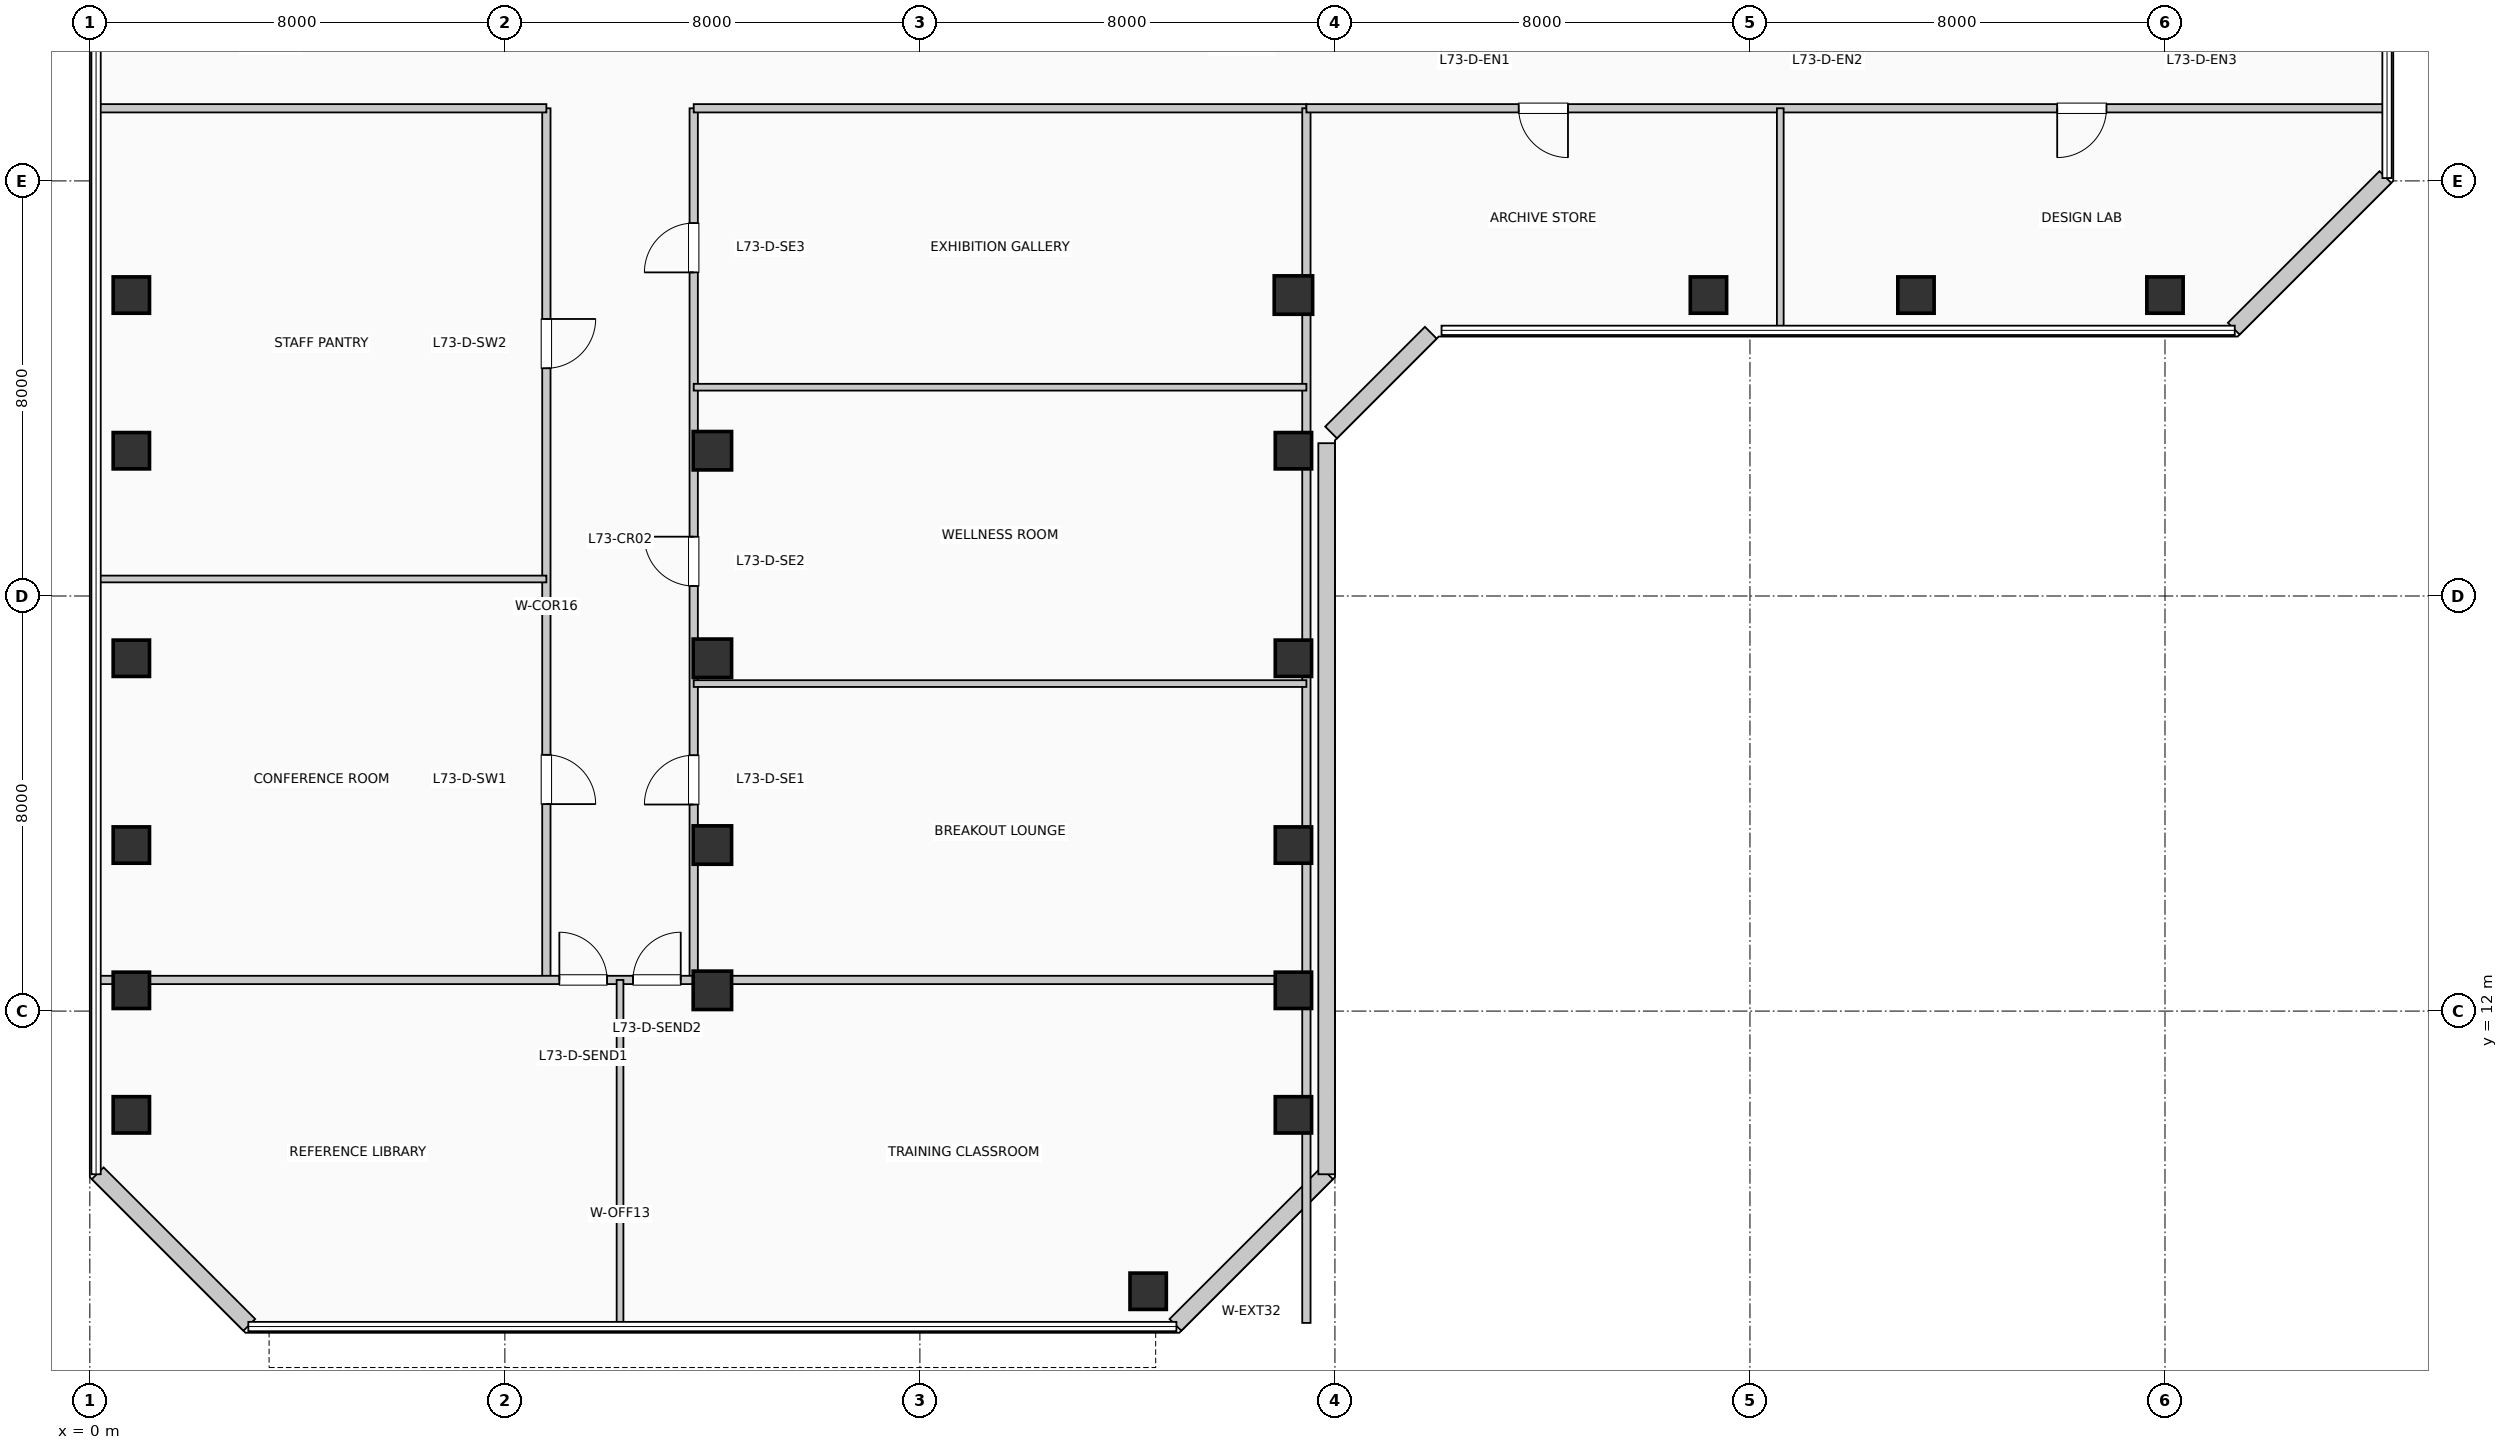
"""IFC4 building model, lengths in metres.
Left out: names, types, materials, properties, quantities, classifications, styles, units other than length and angle.
Written with IfcOpenShell. Run it as: python <this file> out.ifc"""

import sys

from ifc_helpers import new_model, si_unit, direction, frame, frame_2d, origin, origin_2d, place, context, subcontext, project, spatial, rectangle, extrude, element, fill, save


model = new_model("IFC4")
c1 = context("Model", 3, precision=1e-05, world=origin(), true_north=direction((0.0, 1.0)))
c2 = subcontext(c1, "Body", "Model", "MODEL_VIEW")
j1 = project(units=[si_unit("LENGTHUNIT", "METRE"), si_unit("PLANEANGLEUNIT", "RADIAN")], contexts=[c1])
p1 = place(None, origin())
s1 = spatial("IfcSite", under=j1, at=p1, CompositionType="ELEMENT")
p2 = place(p1, origin())
s2 = spatial("IfcBuilding", under=s1, at=p2, CompositionType="ELEMENT")
p3 = place(p2, frame((0.0, 0.0, 299.97)))
s3 = spatial("IfcBuildingStorey", under=s2, at=p3, CompositionType="ELEMENT", Elevation=299.97)
for number, where, z_axis, x_axis in (
    (1, (0.8, 10.0, 0.0), (0.0, 0.0, 1.0), (1.0, 0.0, 0.0)),
    (2, (0.8, 12.4, 0.0), (0.0, 0.0, 1.0), (1.0, 0.0, 0.0)),
    (3, (0.8, 15.2, 0.0), (0.0, 0.0, 1.0), (1.0, 0.0, 0.0)),
    (4, (0.8, 18.8, 0.0), (0.0, 0.0, 1.0), (1.0, 0.0, 0.0)),
    (5, (0.8, 22.8, 0.0), (0.0, 0.0, 1.0), (1.0, 0.0, 0.0)),
    (6, (0.8, 25.8, 0.0), (0.0, 0.0, 1.0), (1.0, 0.0, 0.0)),
):
    element("IfcColumn", number, at=place(p3, frame(where, z_axis=z_axis, x_axis=x_axis)), inside=s3, PredefinedType="COLUMN", context=c2, shape_type="SweptSolid", body=[
        extrude(rectangle(XDim=0.7, YDim=0.7, at=origin_2d()), origin(), (0.0, 0.0, 1.0), 3.96),
    ])
for number, where, z_axis, x_axis in (
    (7, (12.0, 12.4, 0.0), (0.0, 0.0, 1.0), (1.0, 0.0, 0.0)),
    (8, (12.0, 15.2, 0.0), (0.0, 0.0, 1.0), (1.0, 0.0, 0.0)),
    (9, (12.0, 18.8, 0.0), (0.0, 0.0, 1.0), (1.0, 0.0, 0.0)),
    (10, (12.0, 22.8, 0.0), (0.0, 0.0, 1.0), (1.0, 0.0, 0.0)),
):
    element("IfcColumn", number, at=place(p3, frame(where, z_axis=z_axis, x_axis=x_axis)), inside=s3, PredefinedType="COLUMN", context=c2, shape_type="SweptSolid", body=[
        extrude(rectangle(XDim=0.74, YDim=0.74, at=origin_2d()), origin(), (0.0, 0.0, 1.0), 3.96),
    ])
for number, where, z_axis, x_axis in (
    (11, (20.4, 6.6, 0.0), (0.0, 0.0, 1.0), (1.0, 0.0, 0.0)),
    (12, (23.2, 10.0, 0.0), (0.0, 0.0, 1.0), (1.0, 0.0, 0.0)),
    (13, (23.2, 12.4, 0.0), (0.0, 0.0, 1.0), (1.0, 0.0, 0.0)),
    (14, (23.2, 15.2, 0.0), (0.0, 0.0, 1.0), (1.0, 0.0, 0.0)),
    (15, (23.2, 18.8, 0.0), (0.0, 0.0, 1.0), (1.0, 0.0, 0.0)),
    (16, (23.2, 22.8, 0.0), (0.0, 0.0, 1.0), (1.0, 0.0, 0.0)),
):
    element("IfcColumn", number, at=place(p3, frame(where, z_axis=z_axis, x_axis=x_axis)), inside=s3, PredefinedType="COLUMN", context=c2, shape_type="SweptSolid", body=[
        extrude(rectangle(XDim=0.7, YDim=0.7, at=origin_2d()), origin(), (0.0, 0.0, 1.0), 3.96),
    ])
p4 = place(p3, frame((23.2, 25.8, 0.0), z_axis=(0.0, 0.0, 1.0), x_axis=(1.0, 0.0, 0.0)))
e17 = element("IfcColumn", 17, at=p4, inside=s3, PredefinedType="COLUMN", context=c2, shape_type="SweptSolid", body=[
    extrude(rectangle(XDim=0.74, YDim=0.74, at=origin_2d()), origin(), (0.0, 0.0, 1.0), 3.96),
])
for number, where, z_axis, x_axis in (
    (18, (31.2, 25.8, 0.0), (0.0, 0.0, 1.0), (1.0, 0.0, 0.0)),
    (19, (35.2, 25.8, 0.0), (0.0, 0.0, 1.0), (1.0, 0.0, 0.0)),
    (20, (40.0, 25.8, 0.0), (0.0, 0.0, 1.0), (1.0, 0.0, 0.0)),
):
    element("IfcColumn", number, at=place(p3, frame(where, z_axis=z_axis, x_axis=x_axis)), inside=s3, PredefinedType="COLUMN", context=c2, shape_type="SweptSolid", body=[
        extrude(rectangle(XDim=0.7, YDim=0.7, at=origin_2d()), origin(), (0.0, 0.0, 1.0), 3.96),
    ])
p5 = place(p3, frame((20.926, 5.952, 0.0), z_axis=(0.0, 0.0, 1.0), x_axis=(0.707077242712, 0.707136318428, 0.0)))
e21 = element("IfcWall", 21, at=p5, inside=s3, PredefinedType="SOLIDWALL", context=c2, shape_type="SweptSolid", body=[
    extrude(rectangle(XDim=4.133, YDim=0.32, at=frame_2d((2.066, 0.0))), origin(), (0.0, 0.0, 1.0), 3.74),
])
p6 = place(p3, frame((23.84, 8.855, 0.0), z_axis=(0.0, 0.0, 1.0), x_axis=(0.0, 1.0, 0.0)))
e22 = element("IfcWall", 22, at=p6, inside=s3, PredefinedType="SOLIDWALL", context=c2, shape_type="SweptSolid", body=[
    extrude(rectangle(XDim=14.09, YDim=0.32, at=frame_2d((7.045, 0.0))), origin(), (0.0, 0.0, 1.0), 3.74),
])
p7 = place(p3, frame((23.926, 23.152, 0.0), z_axis=(0.0, 0.0, 1.0), x_axis=(0.707106781187, 0.707106781187, 0.0)))
e23 = element("IfcWall", 23, at=p7, inside=s3, PredefinedType="SOLIDWALL", context=c2, shape_type="SweptSolid", body=[
    extrude(rectangle(XDim=2.718, YDim=0.32, at=frame_2d((1.359, 0.0))), origin(), (0.0, 0.0, 1.0), 3.74),
])
for number, where, z_axis, x_axis in (
    (24, (41.326, 25.152, 0.0), (0.0, 0.0, 1.0), (0.707, 0.707, 0.0)),
    (25, (0.152, 8.874, 0.0), (0.0, 0.0, 1.0), (0.707, -0.707, 0.0)),
):
    element("IfcWall", number, at=place(p3, frame(where, z_axis=z_axis, x_axis=x_axis)), inside=s3, PredefinedType="SOLIDWALL", context=c2, shape_type="SweptSolid", body=[
        extrude(rectangle(XDim=4.133, YDim=0.32, at=frame_2d((2.066, 0.0))), origin(), (0.0, 0.0, 1.0), 3.74),
    ])
p8 = place(p3, frame((8.8, 12.6, 0.0), z_axis=(0.0, 0.0, 1.0), x_axis=(0.0, 1.0, 0.0)))
e26 = element("IfcWall", 26, at=p8, inside=s3, PredefinedType="PARTITIONING", context=c2, shape_type="SweptSolid", body=[
    extrude(rectangle(XDim=16.8, YDim=0.16, at=frame_2d((8.4, 0.0))), origin(), (0.0, 0.0, 1.0), 3.74),
])
p9 = place(p8, frame((4.339, 0.0, 0.0), z_axis=(0.0, 0.0, 1.0), x_axis=(-1.0, 0.0, 0.0)))
e27 = element("IfcOpeningElement", 27, at=p9, cuts=e26, PredefinedType="OPENING", context=c2, shape_type="SweptSolid", body=[
    extrude(rectangle(XDim=0.95, YDim=2.15, at=frame_2d((0.475, 1.075))), frame((0.0, 0.09, 0.0), z_axis=(0.0, -1.0, 0.0), x_axis=(1.0, 0.0, 0.0)), (0.0, 0.0, 1.0), 0.18),
])
p10 = place(p8, frame((12.739, 0.0, 0.0), z_axis=(0.0, 0.0, 1.0), x_axis=(-1.0, 0.0, 0.0)))
e28 = element("IfcOpeningElement", 28, at=p10, cuts=e26, PredefinedType="OPENING", context=c2, shape_type="SweptSolid", body=[
    extrude(rectangle(XDim=0.95, YDim=2.15, at=frame_2d((0.475, 1.075))), frame((0.0, 0.09, 0.0), z_axis=(0.0, -1.0, 0.0), x_axis=(1.0, 0.0, 0.0)), (0.0, 0.0, 1.0), 0.18),
])
p11 = place(p3, frame((11.64, 12.6, 0.0), z_axis=(0.0, 0.0, 1.0), x_axis=(0.0, 1.0, 0.0)))
e29 = element("IfcWall", 29, at=p11, inside=s3, PredefinedType="PARTITIONING", context=c2, shape_type="SweptSolid", body=[
    extrude(rectangle(XDim=16.8, YDim=0.16, at=frame_2d((8.4, 0.0))), origin(), (0.0, 0.0, 1.0), 3.175),
])
p12 = place(p11, frame((3.381, 0.0, 0.0)))
e30 = element("IfcOpeningElement", 30, at=p12, cuts=e29, PredefinedType="OPENING", context=c2, shape_type="SweptSolid", body=[
    extrude(rectangle(XDim=0.95, YDim=2.15, at=frame_2d((0.475, 1.075))), frame((0.0, 0.09, 0.0), z_axis=(0.0, -1.0, 0.0), x_axis=(1.0, 0.0, 0.0)), (0.0, 0.0, 1.0), 0.18),
])
p13 = place(p11, frame((7.593, 0.0, 0.0)))
e31 = element("IfcOpeningElement", 31, at=p13, cuts=e29, PredefinedType="OPENING", context=c2, shape_type="SweptSolid", body=[
    extrude(rectangle(XDim=0.95, YDim=2.15, at=frame_2d((0.475, 1.075))), frame((0.0, 0.09, 0.0), z_axis=(0.0, -1.0, 0.0), x_axis=(1.0, 0.0, 0.0)), (0.0, 0.0, 1.0), 0.18),
])
p14 = place(p11, frame((13.637, 0.0, 0.0)))
e32 = element("IfcOpeningElement", 32, at=p14, cuts=e29, PredefinedType="OPENING", context=c2, shape_type="SweptSolid", body=[
    extrude(rectangle(XDim=0.95, YDim=2.15, at=frame_2d((0.475, 1.075))), frame((0.0, 0.09, 0.0), z_axis=(0.0, -1.0, 0.0), x_axis=(1.0, 0.0, 0.0)), (0.0, 0.0, 1.0), 0.18),
])
p15 = place(p3, frame((0.19, 12.6, 0.0), z_axis=(0.0, 0.0, 1.0), x_axis=(1.0, 0.0, 0.0)))
e33 = element("IfcWall", 33, at=p15, inside=s3, PredefinedType="PARTITIONING", context=c2, shape_type="SweptSolid", body=[
    extrude(rectangle(XDim=23.26, YDim=0.16, at=frame_2d((11.63, 0.0))), origin(), (0.0, 0.0, 1.0), 3.175),
])
p16 = place(p15, frame((8.86, 0.0, 0.0)))
e34 = element("IfcOpeningElement", 34, at=p16, cuts=e33, PredefinedType="OPENING", context=c2, shape_type="SweptSolid", body=[
    extrude(rectangle(XDim=0.92, YDim=2.1, at=frame_2d((0.46, 1.05))), frame((0.0, 0.09, 0.0), z_axis=(0.0, -1.0, 0.0), x_axis=(1.0, 0.0, 0.0)), (0.0, 0.0, 1.0), 0.18),
])
p17 = place(p15, frame((10.28, 0.0, 0.0)))
e35 = element("IfcOpeningElement", 35, at=p17, cuts=e33, PredefinedType="OPENING", context=c2, shape_type="SweptSolid", body=[
    extrude(rectangle(XDim=0.92, YDim=2.1, at=frame_2d((0.46, 1.05))), frame((0.0, 0.09, 0.0), z_axis=(0.0, -1.0, 0.0), x_axis=(1.0, 0.0, 0.0)), (0.0, 0.0, 1.0), 0.18),
])
p18 = place(p3, frame((0.19, 29.4, 0.0), z_axis=(0.0, 0.0, 1.0), x_axis=(1.0, 0.0, 0.0)))
e36 = element("IfcWall", 36, at=p18, inside=s3, PredefinedType="PARTITIONING", context=c2, shape_type="SweptSolid", body=[
    extrude(rectangle(XDim=8.61, YDim=0.16, at=frame_2d((4.305, 0.0))), origin(), (0.0, 0.0, 1.0), 3.425),
])
p19 = place(p3, frame((11.64, 29.4, 0.0), z_axis=(0.0, 0.0, 1.0), x_axis=(1.0, 0.0, 0.0)))
e37 = element("IfcWall", 37, at=p19, inside=s3, PredefinedType="PARTITIONING", context=c2, shape_type="SweptSolid", body=[
    extrude(rectangle(XDim=11.81, YDim=0.16, at=frame_2d((5.905, 0.0))), origin(), (0.0, 0.0, 1.0), 3.425),
])
p20 = place(p3, frame((23.45, 5.99, 0.0), z_axis=(0.0, 0.0, 1.0), x_axis=(0.0, 1.0, 0.0)))
e38 = element("IfcWall", 38, at=p20, inside=s3, PredefinedType="PARTITIONING", context=c2, shape_type="SweptSolid", body=[
    extrude(rectangle(XDim=23.41, YDim=0.16, at=frame_2d((11.705, 0.0))), origin(), (0.0, 0.0, 1.0), 3.175),
])
p21 = place(p3, frame((10.22, 5.99, 0.0), z_axis=(0.0, 0.0, 1.0), x_axis=(0.0, 1.0, 0.0)))
e39 = element("IfcWall", 39, at=p21, inside=s3, PredefinedType="PARTITIONING", context=c2, shape_type="SweptSolid", body=[
    extrude(rectangle(XDim=6.61, YDim=0.13, at=frame_2d((3.305, 0.0))), origin(), (0.0, 0.0, 1.0), 3.74),
])
p22 = place(p3, frame((0.19, 20.328, 0.0), z_axis=(0.0, 0.0, 1.0), x_axis=(1.0, 0.0, 0.0)))
e40 = element("IfcWall", 40, at=p22, inside=s3, PredefinedType="PARTITIONING", context=c2, shape_type="SweptSolid", body=[
    extrude(rectangle(XDim=8.61, YDim=0.13, at=frame_2d((4.305, 0.0))), origin(), (0.0, 0.0, 1.0), 3.74),
])
for number, where, z_axis, x_axis in (
    (41, (11.64, 18.312, 0.0), (0.0, 0.0, 1.0), (1.0, 0.0, 0.0)),
    (42, (11.64, 24.024, 0.0), (0.0, 0.0, 1.0), (1.0, 0.0, 0.0)),
):
    element("IfcWall", number, at=place(p3, frame(where, z_axis=z_axis, x_axis=x_axis)), inside=s3, PredefinedType="PARTITIONING", context=c2, shape_type="SweptSolid", body=[
        extrude(rectangle(XDim=11.81, YDim=0.13, at=frame_2d((5.905, 0.0))), origin(), (0.0, 0.0, 1.0), 3.74),
    ])
p23 = place(p3, frame((23.45, 29.4, 0.0), z_axis=(0.0, 0.0, 1.0), x_axis=(1.0, 0.0, 0.0)))
e43 = element("IfcWall", 43, at=p23, inside=s3, PredefinedType="PARTITIONING", context=c2, shape_type="SweptSolid", body=[
    extrude(rectangle(XDim=20.76, YDim=0.16, at=frame_2d((10.38, 0.0))), origin(), (0.0, 0.0, 1.0), 3.425),
])
p24 = place(p23, frame((5.042, 0.0, 0.0), z_axis=(0.0, 0.0, 1.0), x_axis=(-1.0, 0.0, 0.0)))
e44 = element("IfcOpeningElement", 44, at=p24, cuts=e43, PredefinedType="OPENING", context=c2, shape_type="SweptSolid", body=[
    extrude(rectangle(XDim=0.95, YDim=2.15, at=frame_2d((0.475, 1.075))), frame((0.0, 0.09, 0.0), z_axis=(0.0, -1.0, 0.0), x_axis=(1.0, 0.0, 0.0)), (0.0, 0.0, 1.0), 0.18),
])
p25 = place(p23, frame((15.422, 0.0, 0.0), z_axis=(0.0, 0.0, 1.0), x_axis=(-1.0, 0.0, 0.0)))
e45 = element("IfcOpeningElement", 45, at=p25, cuts=e43, PredefinedType="OPENING", context=c2, shape_type="SweptSolid", body=[
    extrude(rectangle(XDim=0.95, YDim=2.15, at=frame_2d((0.475, 1.075))), frame((0.0, 0.09, 0.0), z_axis=(0.0, -1.0, 0.0), x_axis=(1.0, 0.0, 0.0)), (0.0, 0.0, 1.0), 0.18),
])
p26 = place(p3, frame((32.584, 25.19, 0.0), z_axis=(0.0, 0.0, 1.0), x_axis=(0.0, 1.0, 0.0)))
e46 = element("IfcWall", 46, at=p26, inside=s3, PredefinedType="PARTITIONING", context=c2, shape_type="SweptSolid", body=[
    extrude(rectangle(XDim=4.21, YDim=0.13, at=frame_2d((2.105, 0.0))), origin(), (0.0, 0.0, 1.0), 3.74),
])
p27 = place(p16, origin())
e47 = element("IfcDoor", 47, at=p27, inside=s3, OperationType="SINGLE_SWING_LEFT", PredefinedType="DOOR", context=c2, shape_type="SweptSolid", body=[
    extrude(rectangle(XDim=0.92, YDim=2.1, at=frame_2d((0.46, 1.05))), frame((0.0, 0.025, 0.0), z_axis=(0.0, -1.0, 0.0), x_axis=(1.0, 0.0, 0.0)), (0.0, 0.0, 1.0), 0.05),
])
fill(e34, e47)
p28 = place(p17, origin())
e48 = element("IfcDoor", 48, at=p28, inside=s3, OperationType="SINGLE_SWING_RIGHT", PredefinedType="DOOR", context=c2, shape_type="SweptSolid", body=[
    extrude(rectangle(XDim=0.92, YDim=2.1, at=frame_2d((0.46, 1.05))), frame((0.0, 0.025, 0.0), z_axis=(0.0, -1.0, 0.0), x_axis=(1.0, 0.0, 0.0)), (0.0, 0.0, 1.0), 0.05),
])
fill(e35, e48)
p29 = place(p9, origin())
e49 = element("IfcDoor", 49, at=p29, inside=s3, OperationType="SINGLE_SWING_LEFT", PredefinedType="DOOR", context=c2, shape_type="SweptSolid", body=[
    extrude(rectangle(XDim=0.95, YDim=2.15, at=frame_2d((0.475, 1.075))), frame((0.0, 0.025, 0.0), z_axis=(0.0, -1.0, 0.0), x_axis=(1.0, 0.0, 0.0)), (0.0, 0.0, 1.0), 0.05),
])
fill(e27, e49)
p30 = place(p10, origin())
e50 = element("IfcDoor", 50, at=p30, inside=s3, OperationType="SINGLE_SWING_RIGHT", PredefinedType="DOOR", context=c2, shape_type="SweptSolid", body=[
    extrude(rectangle(XDim=0.95, YDim=2.15, at=frame_2d((0.475, 1.075))), frame((0.0, 0.025, 0.0), z_axis=(0.0, -1.0, 0.0), x_axis=(1.0, 0.0, 0.0)), (0.0, 0.0, 1.0), 0.05),
])
fill(e28, e50)
p31 = place(p12, origin())
e51 = element("IfcDoor", 51, at=p31, inside=s3, OperationType="SINGLE_SWING_LEFT", PredefinedType="DOOR", context=c2, shape_type="SweptSolid", body=[
    extrude(rectangle(XDim=0.95, YDim=2.15, at=frame_2d((0.475, 1.075))), frame((0.0, 0.025, 0.0), z_axis=(0.0, -1.0, 0.0), x_axis=(1.0, 0.0, 0.0)), (0.0, 0.0, 1.0), 0.05),
])
fill(e30, e51)
p32 = place(p13, origin())
e52 = element("IfcDoor", 52, at=p32, inside=s3, OperationType="SINGLE_SWING_RIGHT", PredefinedType="DOOR", context=c2, shape_type="SweptSolid", body=[
    extrude(rectangle(XDim=0.95, YDim=2.15, at=frame_2d((0.475, 1.075))), frame((0.0, 0.025, 0.0), z_axis=(0.0, -1.0, 0.0), x_axis=(1.0, 0.0, 0.0)), (0.0, 0.0, 1.0), 0.05),
])
fill(e31, e52)
p33 = place(p14, origin())
e53 = element("IfcDoor", 53, at=p33, inside=s3, OperationType="SINGLE_SWING_LEFT", PredefinedType="DOOR", context=c2, shape_type="SweptSolid", body=[
    extrude(rectangle(XDim=0.95, YDim=2.15, at=frame_2d((0.475, 1.075))), frame((0.0, 0.025, 0.0), z_axis=(0.0, -1.0, 0.0), x_axis=(1.0, 0.0, 0.0)), (0.0, 0.0, 1.0), 0.05),
])
fill(e32, e53)
p34 = place(p24, origin())
e54 = element("IfcDoor", 54, at=p34, inside=s3, OperationType="SINGLE_SWING_RIGHT", PredefinedType="DOOR", context=c2, shape_type="SweptSolid", body=[
    extrude(rectangle(XDim=0.95, YDim=2.15, at=frame_2d((0.475, 1.075))), frame((0.0, 0.025, 0.0), z_axis=(0.0, -1.0, 0.0), x_axis=(1.0, 0.0, 0.0)), (0.0, 0.0, 1.0), 0.05),
])
fill(e44, e54)
p35 = place(p25, origin())
e55 = element("IfcDoor", 55, at=p35, inside=s3, OperationType="SINGLE_SWING_LEFT", PredefinedType="DOOR", context=c2, shape_type="SweptSolid", body=[
    extrude(rectangle(XDim=0.95, YDim=2.15, at=frame_2d((0.475, 1.075))), frame((0.0, 0.025, 0.0), z_axis=(0.0, -1.0, 0.0), x_axis=(1.0, 0.0, 0.0)), (0.0, 0.0, 1.0), 0.05),
])
fill(e45, e55)
save(model, sys.argv[1])
